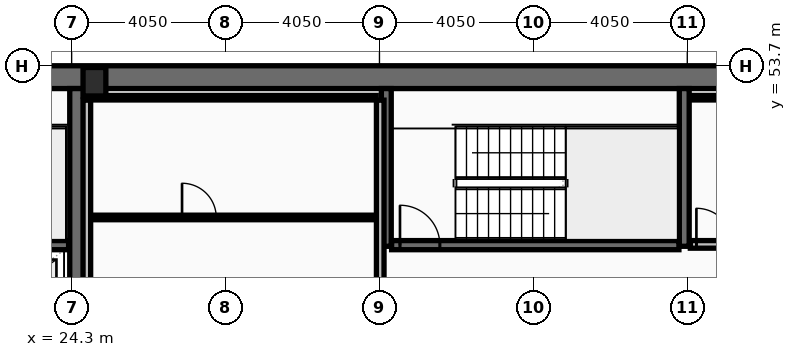
"""IFC4 building model, lengths in metres.
Left out: names, types, materials, properties, quantities, classifications, styles, units other than length and angle.
Written with IfcOpenShell. Run it as: python <this file> out.ifc"""

import sys

from ifc_helpers import new_model, si_unit, direction, frame, frame_2d, origin, origin_2d, place, context, subcontext, project, spatial, rectangle, hollow_rectangle, extrude, element, fill, save


model = new_model("IFC4")
c1 = context("Model", 3, precision=1e-05, world=origin(), true_north=direction((0.0, 1.0)))
c2 = subcontext(c1, "Body", "Model", "MODEL_VIEW")
j1 = project(units=[si_unit("LENGTHUNIT", "METRE"), si_unit("PLANEANGLEUNIT", "RADIAN")], contexts=[c1])
p1 = place(None, origin())
s1 = spatial("IfcSite", under=j1, at=p1, CompositionType="ELEMENT")
p2 = place(p1, origin())
s2 = spatial("IfcBuilding", under=s1, at=p2, CompositionType="ELEMENT")
p3 = place(p2, frame((0.0, 0.0, 242.6)))
s3 = spatial("IfcBuildingStorey", under=s2, at=p3, CompositionType="ELEMENT", Elevation=242.6)
p4 = place(p3, frame((16.2, 53.4, 0.0), z_axis=(0.0, 0.0, 1.0), x_axis=(1.0, 0.0, 0.0)))
e1 = element("IfcWall", 1, at=p4, inside=s3, PredefinedType="SHEAR", context=c2, shape_type="SweptSolid", body=[
    extrude(rectangle(XDim=40.5, YDim=0.6, at=frame_2d((20.25, 0.0))), origin(), (0.0, 0.0, 1.0), 3.44),
])
p5 = place(p3, frame((24.45, 41.9, 0.0), z_axis=(0.0, 0.0, 1.0), x_axis=(0.0, 1.0, 0.0)))
e2 = element("IfcWall", 2, at=p5, inside=s3, PredefinedType="SHEAR", context=c2, shape_type="SweptSolid", body=[
    extrude(rectangle(XDim=11.2, YDim=0.4, at=frame_2d((5.6, 0.0))), origin(), (0.0, 0.0, 1.0), 3.44),
])
for number, where, z_axis, x_axis in (
    (3, (32.58, 48.95, 0.0), (0.0, 0.0, 1.0), (0.0, 1.0, 0.0)),
    (4, (40.42, 48.95, 0.0), (0.0, 0.0, 1.0), (0.0, 1.0, 0.0)),
):
    element("IfcWall", number, at=place(p3, frame(where, z_axis=z_axis, x_axis=x_axis)), inside=s3, PredefinedType="SHEAR", context=c2, shape_type="SweptSolid", body=[
        extrude(rectangle(XDim=4.15, YDim=0.26, at=frame_2d((2.075, 0.0))), origin(), (0.0, 0.0, 1.0), 3.44),
    ])
p6 = place(p3, frame((16.8, 48.98, 0.0), z_axis=(0.0, 0.0, 1.0), x_axis=(1.0, 0.0, 0.0)))
e5 = element("IfcWall", 5, at=p6, inside=s3, PredefinedType="SHEAR", context=c2, shape_type="SweptSolid", body=[
    extrude(rectangle(XDim=7.42, YDim=0.24, at=frame_2d((3.71, 0.0))), origin(), (0.0, 0.0, 1.0), 3.44),
])
p7 = place(p6, frame((0.22, 0.0, 0.0)))
e6 = element("IfcOpeningElement", 6, at=p7, cuts=e5, PredefinedType="OPENING", context=c2, shape_type="SweptSolid", body=[
    extrude(rectangle(XDim=1.05, YDim=2.15, at=frame_2d((0.525, 1.075))), frame((0.0, 0.13, 0.0), z_axis=(0.0, -1.0, 0.0), x_axis=(1.0, 0.0, 0.0)), (0.0, 0.0, 1.0), 0.26),
])
p8 = place(p3, frame((32.72, 48.98, 0.0), z_axis=(0.0, 0.0, 1.0), x_axis=(1.0, 0.0, 0.0)))
e7 = element("IfcWall", 7, at=p8, inside=s3, PredefinedType="SHEAR", context=c2, shape_type="SweptSolid", body=[
    extrude(rectangle(XDim=7.56, YDim=0.24, at=frame_2d((3.78, 0.0))), origin(), (0.0, 0.0, 1.0), 3.44),
])
p9 = place(p8, frame((0.22, 0.0, 0.0)))
e8 = element("IfcOpeningElement", 8, at=p9, cuts=e7, PredefinedType="OPENING", context=c2, shape_type="SweptSolid", body=[
    extrude(rectangle(XDim=1.05, YDim=2.15, at=frame_2d((0.525, 1.075))), frame((0.0, 0.13, 0.0), z_axis=(0.0, -1.0, 0.0), x_axis=(1.0, 0.0, 0.0)), (0.0, 0.0, 1.0), 0.26),
])
p10 = place(p3, frame((24.9, 53.28, 0.0), z_axis=(0.0, 0.0, 1.0), x_axis=(1.0, 0.0, 0.0)))
e9 = element("IfcColumn", 9, at=p10, inside=s3, PredefinedType="COLUMN", context=c2, shape_type="SweptSolid", body=[
    extrude(hollow_rectangle(XDim=0.6, YDim=0.75, WallThickness=0.045, at=origin_2d()), origin(), (0.0, 0.0, 1.0), 3.6),
])
for number, where, z_axis, x_axis in (
    (10, (24.7, 46.805, 0.0), (0.0, 0.0, 1.0), (0.0, 1.0, 0.0)),
    (11, (32.42, 46.805, 0.0), (0.0, 0.0, 1.0), (0.0, 1.0, 0.0)),
):
    element("IfcWall", number, at=place(p3, frame(where, z_axis=z_axis, x_axis=x_axis)), inside=s3, PredefinedType="PARTITIONING", context=c2, shape_type="SweptSolid", body=[
        extrude(rectangle(XDim=5.99, YDim=0.2, at=frame_2d((2.995, 0.0))), origin(), (0.0, 0.0, 1.0), 3.44),
    ])
p11 = place(p3, frame((24.805, 52.86, 0.0), z_axis=(0.0, 0.0, 1.0), x_axis=(1.0, 0.0, 0.0)))
e12 = element("IfcWall", 12, at=p11, inside=s3, PredefinedType="PARTITIONING", context=c2, shape_type="SweptSolid", body=[
    extrude(rectangle(XDim=7.51, YDim=0.12, at=frame_2d((3.755, 0.0))), origin(), (0.0, 0.0, 1.0), 3.44),
])
p12 = place(p3, frame((24.805, 49.709, 0.0), z_axis=(0.0, 0.0, 1.0), x_axis=(1.0, 0.0, 0.0)))
e13 = element("IfcWall", 13, at=p12, inside=s3, PredefinedType="PARTITIONING", context=c2, shape_type="SweptSolid", body=[
    extrude(rectangle(XDim=7.51, YDim=0.12, at=frame_2d((3.755, 0.0))), origin(), (0.0, 0.0, 1.0), 3.44),
])
p13 = place(p12, frame((2.4, 0.0, 0.0)))
e14 = element("IfcOpeningElement", 14, at=p13, cuts=e13, PredefinedType="OPENING", context=c2, shape_type="SweptSolid", body=[
    extrude(rectangle(XDim=0.9, YDim=2.05, at=frame_2d((0.45, 1.025))), frame((0.0, 0.07, 0.0), z_axis=(0.0, -1.0, 0.0), x_axis=(1.0, 0.0, 0.0)), (0.0, 0.0, 1.0), 0.14),
])
p14 = place(p3, frame((40.58, 52.86, 0.0), z_axis=(0.0, 0.0, 1.0), x_axis=(1.0, 0.0, 0.0)))
e15 = element("IfcWall", 15, at=p14, inside=s3, PredefinedType="PARTITIONING", context=c2, shape_type="SweptSolid", body=[
    extrude(rectangle(XDim=7.56, YDim=0.12, at=frame_2d((3.78, 0.0))), origin(), (0.0, 0.0, 1.0), 3.44),
])
p15 = place(p3, frame((40.58, 49.0, 0.0), z_axis=(0.0, 0.0, 1.0), x_axis=(1.0, 0.0, 0.0)))
e16 = element("IfcWall", 16, at=p15, inside=s3, PredefinedType="PARTITIONING", context=c2, shape_type="SweptSolid", body=[
    extrude(rectangle(XDim=7.56, YDim=0.2, at=frame_2d((3.78, 0.0))), origin(), (0.0, 0.0, 1.0), 3.44),
])
p16 = place(p15, frame((0.16, 0.0, 0.0)))
e17 = element("IfcOpeningElement", 17, at=p16, cuts=e16, PredefinedType="OPENING", context=c2, shape_type="SweptSolid", body=[
    extrude(rectangle(XDim=0.95, YDim=2.1, at=frame_2d((0.475, 1.05))), frame((0.0, 0.11, 0.0), z_axis=(0.0, -1.0, 0.0), x_axis=(1.0, 0.0, 0.0)), (0.0, 0.0, 1.0), 0.22),
])
p17 = place(p9, origin())
e18 = element("IfcDoor", 18, at=p17, inside=s3, OperationType="SINGLE_SWING_LEFT", PredefinedType="DOOR", context=c2, shape_type="SweptSolid", body=[
    extrude(rectangle(XDim=1.05, YDim=2.15, at=frame_2d((0.525, 1.075))), frame((0.0, 0.025, 0.0), z_axis=(0.0, -1.0, 0.0), x_axis=(1.0, 0.0, 0.0)), (0.0, 0.0, 1.0), 0.05),
])
fill(e8, e18)
p18 = place(p13, origin())
e19 = element("IfcDoor", 19, at=p18, inside=s3, OperationType="SINGLE_SWING_LEFT", PredefinedType="DOOR", context=c2, shape_type="SweptSolid", body=[
    extrude(rectangle(XDim=0.9, YDim=2.05, at=frame_2d((0.45, 1.025))), frame((0.0, 0.025, 0.0), z_axis=(0.0, -1.0, 0.0), x_axis=(1.0, 0.0, 0.0)), (0.0, 0.0, 1.0), 0.05),
])
fill(e14, e19)
p19 = place(p16, origin())
e20 = element("IfcDoor", 20, at=p19, inside=s3, OperationType="SINGLE_SWING_LEFT", PredefinedType="DOOR", context=c2, shape_type="SweptSolid", body=[
    extrude(rectangle(XDim=0.95, YDim=2.1, at=frame_2d((0.475, 1.05))), frame((0.0, 0.025, 0.0), z_axis=(0.0, -1.0, 0.0), x_axis=(1.0, 0.0, 0.0)), (0.0, 0.0, 1.0), 0.05),
])
fill(e17, e20)
save(model, sys.argv[1])
